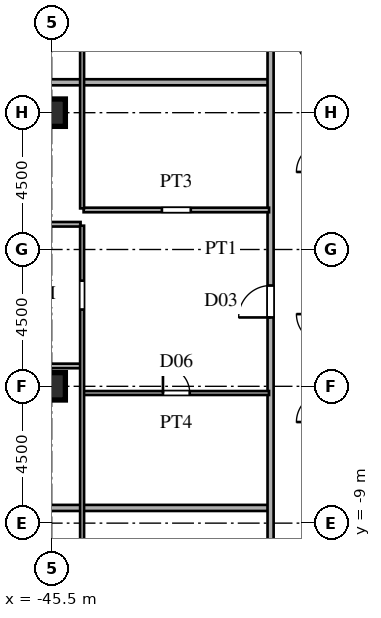
"""IFC4 building model, lengths in metres.
Left out: names, types, materials, properties, quantities, classifications, styles, units other than length and angle.
Written with IfcOpenShell. Run it as: python <this file> out.ifc"""

import sys

from ifc_helpers import new_model, si_unit, direction, frame, frame_2d, origin, origin_2d, place, context, subcontext, project, spatial, rectangle, i_section, extrude, source, transform, mapped, element, fill, save


model = new_model("IFC4")
c1 = context("Model", 3, precision=1e-05, world=origin(), true_north=direction((0.0, 1.0)))
c2 = subcontext(c1, "Body", "Model", "MODEL_VIEW")
j1 = project(units=[si_unit("LENGTHUNIT", "METRE"), si_unit("PLANEANGLEUNIT", "RADIAN")], contexts=[c1])
p1 = place(None, origin())
s1 = spatial("IfcSite", under=j1, at=p1, CompositionType="ELEMENT")
p2 = place(p1, origin())
s2 = spatial("IfcBuilding", under=s1, at=p2, CompositionType="ELEMENT")
p3 = place(p2, frame((0.0, 0.0, 47.7)))
s3 = spatial("IfcBuildingStorey", under=s2, at=p3, CompositionType="ELEMENT", Elevation=47.7)
m1 = source(origin(), c2, "Body", "SweptSolid", [
    extrude(i_section(OverallWidth=0.9, OverallDepth=0.9, WebThickness=0.036, FlangeThickness=0.055, at=origin_2d()), origin(), (0.0, 0.0, 1.0), 3.6),
])
for number, where, z_axis, x_axis in (
    (1, (-45.5, -4.5, 0.0), (0.0, 0.0, 1.0), (1.0, 0.0, 0.0)),
    (2, (-45.5, 4.5, 0.0), (0.0, 0.0, 1.0), (1.0, 0.0, 0.0)),
):
    element("IfcColumn", number, at=place(p3, frame(where, z_axis=z_axis, x_axis=x_axis)), inside=s3, PredefinedType="COLUMN", context=c2, shape_type="MappedRepresentation", body=[
        mapped(m1, transform((0.0, 0.0, 0.0), scale=1.0)),
    ])
p4 = place(p3, frame((-72.505, -8.5, 0.0), z_axis=(0.0, 0.0, 1.0), x_axis=(1.0, 0.0, 0.0)))
e3 = element("IfcWall", 3, at=p4, inside=s3, PredefinedType="PARTITIONING", context=c2, shape_type="SweptSolid", body=[
    extrude(rectangle(XDim=34.125, YDim=0.2, at=frame_2d((17.062, 0.0))), origin(), (0.0, 0.0, 1.0), 3.38),
])
p5 = place(p3, frame((-44.45, -4.72, 0.0), z_axis=(0.0, 0.0, 1.0), x_axis=(1.0, 0.0, 0.0)))
e4 = element("IfcWall", 4, at=p5, inside=s3, PredefinedType="PARTITIONING", context=c2, shape_type="SweptSolid", body=[
    extrude(rectangle(XDim=6.1, YDim=0.13, at=frame_2d((3.05, 0.0))), origin(), (0.0, 0.0, 1.0), 3.38),
])
p6 = place(p5, frame((2.61, 0.0, 0.0)))
e5 = element("IfcOpeningElement", 5, at=p6, cuts=e4, PredefinedType="OPENING", context=c2, shape_type="SweptSolid", body=[
    extrude(rectangle(XDim=0.88, YDim=2.1, at=frame_2d((0.44, 1.05))), frame((0.0, 0.075, 0.0), z_axis=(0.0, -1.0, 0.0), x_axis=(1.0, 0.0, 0.0)), (0.0, 0.0, 1.0), 0.15),
])
p7 = place(p3, frame((-72.535, -3.83, 0.0), z_axis=(0.0, 0.0, 1.0), x_axis=(1.0, 0.0, 0.0)))
e6 = element("IfcWall", 6, at=p7, inside=s3, PredefinedType="PARTITIONING", context=c2, shape_type="SweptSolid", body=[
    extrude(rectangle(XDim=27.985, YDim=0.15, at=frame_2d((13.992, 0.0))), origin(), (0.0, 0.0, 1.0), 3.38),
])
p8 = place(p7, frame((22.56, 0.0, 0.0)))
e7 = element("IfcOpeningElement", 7, at=p8, cuts=e6, PredefinedType="OPENING", context=c2, shape_type="SweptSolid", body=[
    extrude(rectangle(XDim=0.95, YDim=2.15, at=frame_2d((0.475, 1.075))), frame((0.0, 0.085, 0.0), z_axis=(0.0, -1.0, 0.0), x_axis=(1.0, 0.0, 0.0)), (0.0, 0.0, 1.0), 0.17),
])
p9 = place(p7, frame((14.71, 0.0, 0.0)))
e8 = element("IfcOpeningElement", 8, at=p9, cuts=e6, PredefinedType="OPENING", context=c2, shape_type="SweptSolid", body=[
    extrude(rectangle(XDim=0.95, YDim=2.15, at=frame_2d((0.475, 1.075))), frame((0.0, 0.085, 0.0), z_axis=(0.0, -1.0, 0.0), x_axis=(1.0, 0.0, 0.0)), (0.0, 0.0, 1.0), 0.17),
])
p10 = place(p3, frame((-72.535, 0.83, 0.0), z_axis=(0.0, 0.0, 1.0), x_axis=(1.0, 0.0, 0.0)))
e9 = element("IfcWall", 9, at=p10, inside=s3, PredefinedType="PARTITIONING", context=c2, shape_type="SweptSolid", body=[
    extrude(rectangle(XDim=27.985, YDim=0.15, at=frame_2d((13.992, 0.0))), origin(), (0.0, 0.0, 1.0), 3.38),
])
p11 = place(p10, frame((22.56, 0.0, 0.0)))
e10 = element("IfcOpeningElement", 10, at=p11, cuts=e9, PredefinedType="OPENING", context=c2, shape_type="SweptSolid", body=[
    extrude(rectangle(XDim=0.95, YDim=2.15, at=frame_2d((0.475, 1.075))), frame((0.0, 0.085, 0.0), z_axis=(0.0, -1.0, 0.0), x_axis=(1.0, 0.0, 0.0)), (0.0, 0.0, 1.0), 0.17),
])
p12 = place(p10, frame((14.71, 0.0, 0.0)))
e11 = element("IfcOpeningElement", 11, at=p12, cuts=e9, PredefinedType="OPENING", context=c2, shape_type="SweptSolid", body=[
    extrude(rectangle(XDim=0.95, YDim=2.15, at=frame_2d((0.475, 1.075))), frame((0.0, 0.085, 0.0), z_axis=(0.0, -1.0, 0.0), x_axis=(1.0, 0.0, 0.0)), (0.0, 0.0, 1.0), 0.17),
])
p13 = place(p3, frame((-44.45, 1.3, 0.0), z_axis=(0.0, 0.0, 1.0), x_axis=(1.0, 0.0, 0.0)))
e12 = element("IfcWall", 12, at=p13, inside=s3, PredefinedType="PARTITIONING", context=c2, shape_type="SweptSolid", body=[
    extrude(rectangle(XDim=6.1, YDim=0.15, at=frame_2d((3.05, 0.0))), origin(), (0.0, 0.0, 1.0), 3.38),
])
p14 = place(p13, frame((2.575, 0.0, 0.0)))
e13 = element("IfcOpeningElement", 13, at=p14, cuts=e12, PredefinedType="OPENING", context=c2, shape_type="SweptSolid", body=[
    extrude(rectangle(XDim=0.95, YDim=2.15, at=frame_2d((0.475, 1.075))), frame((0.0, 0.085, 0.0), z_axis=(0.0, -1.0, 0.0), x_axis=(1.0, 0.0, 0.0)), (0.0, 0.0, 1.0), 0.17),
])
p15 = place(p3, frame((-72.505, 5.5, 0.0), z_axis=(0.0, 0.0, 1.0), x_axis=(1.0, 0.0, 0.0)))
e14 = element("IfcWall", 14, at=p15, inside=s3, PredefinedType="PARTITIONING", context=c2, shape_type="SweptSolid", body=[
    extrude(rectangle(XDim=34.125, YDim=0.2, at=frame_2d((17.062, 0.0))), origin(), (0.0, 0.0, 1.0), 3.38),
])
p16 = place(p3, frame((-44.5, -21.368, 0.0), z_axis=(0.0, 0.0, 1.0), x_axis=(0.0, 1.0, 0.0)))
e15 = element("IfcWall", 15, at=p16, inside=s3, PredefinedType="PARTITIONING", context=c2, shape_type="SweptSolid", body=[
    extrude(rectangle(XDim=22.151, YDim=0.13, at=frame_2d((11.075, 0.0))), origin(), (0.0, 0.0, 1.0), 3.38),
])
p17 = place(p16, frame((8.932, 0.0, 0.0)))
e16 = element("IfcOpeningElement", 16, at=p17, cuts=e15, PredefinedType="OPENING", context=c2, shape_type="SweptSolid", body=[
    extrude(rectangle(XDim=0.95, YDim=2.15, at=frame_2d((0.475, 1.075))), frame((0.0, 0.075, 0.0), z_axis=(0.0, -1.0, 0.0), x_axis=(1.0, 0.0, 0.0)), (0.0, 0.0, 1.0), 0.15),
])
p18 = place(p16, frame((0.724, 0.0, 0.0)))
e17 = element("IfcOpeningElement", 17, at=p18, cuts=e15, PredefinedType="OPENING", context=c2, shape_type="SweptSolid", body=[
    extrude(rectangle(XDim=0.95, YDim=2.15, at=frame_2d((0.475, 1.075))), frame((0.0, 0.075, 0.0), z_axis=(0.0, -1.0, 0.0), x_axis=(1.0, 0.0, 0.0)), (0.0, 0.0, 1.0), 0.15),
])
p19 = place(p16, frame((19.393, 0.0, 0.0)))
e18 = element("IfcOpeningElement", 18, at=p19, cuts=e15, PredefinedType="OPENING", context=c2, shape_type="SweptSolid", body=[
    extrude(rectangle(XDim=0.95, YDim=2.15, at=frame_2d((0.475, 1.075))), frame((0.0, 0.075, 0.0), z_axis=(0.0, -1.0, 0.0), x_axis=(1.0, 0.0, 0.0)), (0.0, 0.0, 1.0), 0.15),
])
p20 = place(p3, frame((-44.5, 1.352, 0.0), z_axis=(0.0, 0.0, 1.0), x_axis=(0.0, 1.0, 0.0)))
e19 = element("IfcWall", 19, at=p20, inside=s3, PredefinedType="PARTITIONING", context=c2, shape_type="SweptSolid", body=[
    extrude(rectangle(XDim=20.016, YDim=0.13, at=frame_2d((10.008, 0.0))), origin(), (0.0, 0.0, 1.0), 3.38),
])
p21 = place(p20, frame((8.101, 0.0, 0.0)))
e20 = element("IfcOpeningElement", 20, at=p21, cuts=e19, PredefinedType="OPENING", context=c2, shape_type="SweptSolid", body=[
    extrude(rectangle(XDim=0.95, YDim=2.15, at=frame_2d((0.475, 1.075))), frame((0.0, 0.075, 0.0), z_axis=(0.0, -1.0, 0.0), x_axis=(1.0, 0.0, 0.0)), (0.0, 0.0, 1.0), 0.15),
])
p22 = place(p20, frame((9.601, 0.0, 0.0)))
e21 = element("IfcOpeningElement", 21, at=p22, cuts=e19, PredefinedType="OPENING", context=c2, shape_type="SweptSolid", body=[
    extrude(rectangle(XDim=0.95, YDim=2.15, at=frame_2d((0.475, 1.075))), frame((0.0, 0.075, 0.0), z_axis=(0.0, -1.0, 0.0), x_axis=(1.0, 0.0, 0.0)), (0.0, 0.0, 1.0), 0.15),
])
p23 = place(p3, frame((-38.3, -15.515, 0.0), z_axis=(0.0, 0.0, 1.0), x_axis=(0.0, 1.0, 0.0)))
e22 = element("IfcWall", 22, at=p23, inside=s3, PredefinedType="PARTITIONING", context=c2, shape_type="SweptSolid", body=[
    extrude(rectangle(XDim=31.03, YDim=0.2, at=frame_2d((15.515, 0.0))), origin(), (0.0, 0.0, 1.0), 3.38),
])
p24 = place(p23, frame((2.345, 0.0, 0.0)))
e23 = element("IfcOpeningElement", 23, at=p24, cuts=e22, PredefinedType="OPENING", context=c2, shape_type="SweptSolid", body=[
    extrude(rectangle(XDim=1.05, YDim=2.25, at=frame_2d((0.525, 1.125))), frame((0.0, 0.11, 0.0), z_axis=(0.0, -1.0, 0.0), x_axis=(1.0, 0.0, 0.0)), (0.0, 0.0, 1.0), 0.22),
])
p25 = place(p23, frame((13.28, 0.0, 0.0)))
e24 = element("IfcOpeningElement", 24, at=p25, cuts=e22, PredefinedType="OPENING", context=c2, shape_type="SweptSolid", body=[
    extrude(rectangle(XDim=1.05, YDim=2.25, at=frame_2d((0.525, 1.125))), frame((0.0, 0.11, 0.0), z_axis=(0.0, -1.0, 0.0), x_axis=(1.0, 0.0, 0.0)), (0.0, 0.0, 1.0), 0.22),
])
p26 = place(p23, frame((25.567, 0.0, 0.0)))
e25 = element("IfcOpeningElement", 25, at=p26, cuts=e22, PredefinedType="OPENING", context=c2, shape_type="SweptSolid", body=[
    extrude(rectangle(XDim=1.05, YDim=2.25, at=frame_2d((0.525, 1.125))), frame((0.0, 0.11, 0.0), z_axis=(0.0, -1.0, 0.0), x_axis=(1.0, 0.0, 0.0)), (0.0, 0.0, 1.0), 0.22),
])
m2 = source(origin(), c2, "Body", "SweptSolid", [
    extrude(rectangle(XDim=0.88, YDim=2.1, at=frame_2d((0.44, 1.05))), frame((0.0, 0.025, 0.0), z_axis=(0.0, -1.0, 0.0), x_axis=(1.0, 0.0, 0.0)), (0.0, 0.0, 1.0), 0.05),
])
p27 = place(p6, origin())
e26 = element("IfcDoor", 26, at=p27, inside=s3, OperationType="SINGLE_SWING_LEFT", PredefinedType="DOOR", context=c2, shape_type="MappedRepresentation", body=[
    mapped(m2, transform((0.0, 0.0, 0.0), scale=1.0)),
])
fill(e5, e26)
m3 = source(origin(), c2, "Body", "SweptSolid", [
    extrude(rectangle(XDim=1.05, YDim=2.25, at=frame_2d((0.525, 1.125))), frame((0.0, 0.025, 0.0), z_axis=(0.0, -1.0, 0.0), x_axis=(1.0, 0.0, 0.0)), (0.0, 0.0, 1.0), 0.05),
])
p28 = place(p25, origin())
e27 = element("IfcDoor", 27, at=p28, inside=s3, OperationType="SINGLE_SWING_LEFT", PredefinedType="DOOR", context=c2, shape_type="MappedRepresentation", body=[
    mapped(m3, transform((0.0, 0.0, 0.0), scale=1.0)),
])
fill(e24, e27)
save(model, sys.argv[1])
